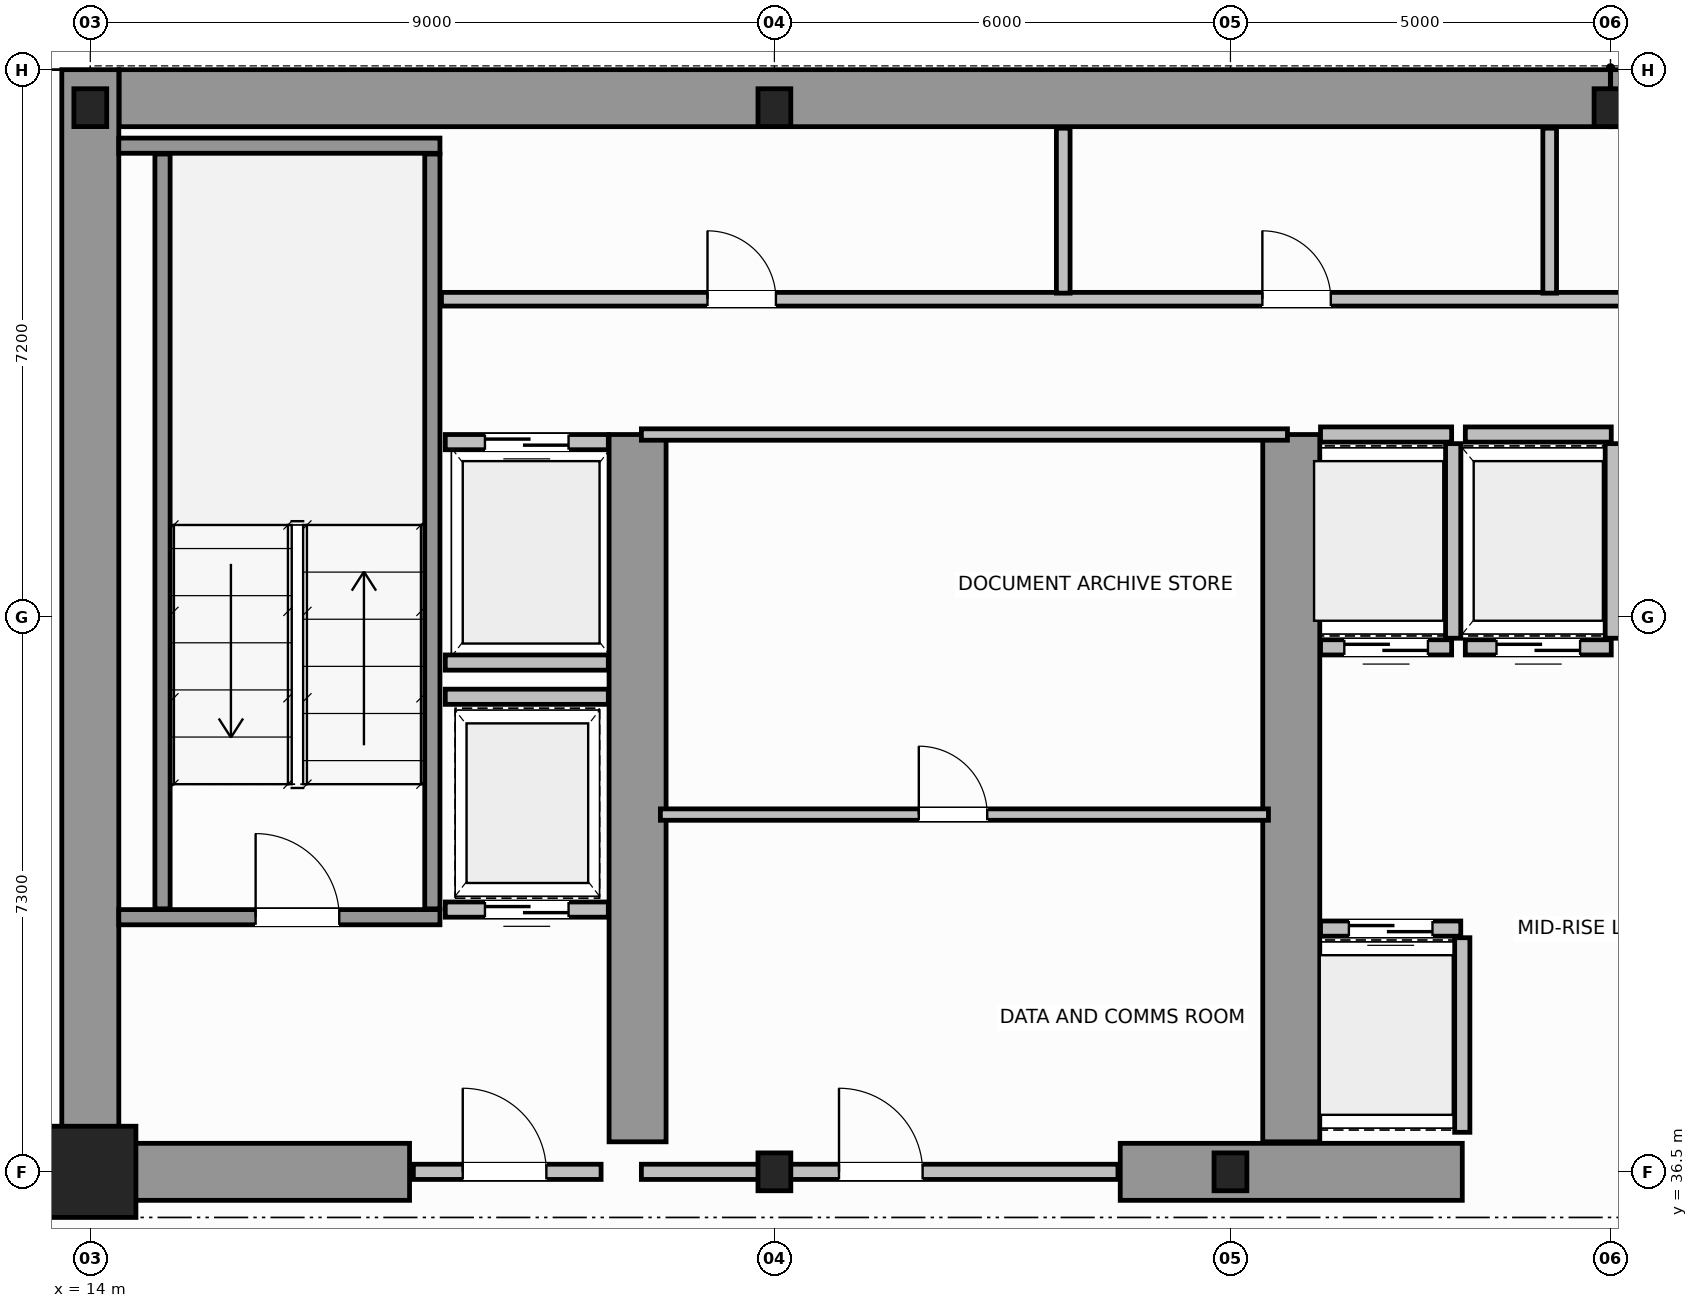
"""IFC4 building model, lengths in metres.
Left out: names, types, materials, properties, quantities, classifications, styles, units other than length and angle.
Written with IfcOpenShell. Run it as: python <this file> out.ifc"""

import sys

from ifc_helpers import new_model, si_unit, direction, frame, frame_2d, origin, origin_2d, place, context, subcontext, project, spatial, rectangle, i_section, extrude, source, transform, mapped, element, fill, save


model = new_model("IFC4")
c1 = context("Model", 3, precision=1e-05, world=origin(), true_north=direction((0.0, 1.0)))
c2 = subcontext(c1, "Body", "Model", "MODEL_VIEW")
j1 = project(units=[si_unit("LENGTHUNIT", "METRE"), si_unit("PLANEANGLEUNIT", "RADIAN")], contexts=[c1])
p1 = place(None, origin())
s1 = spatial("IfcSite", under=j1, at=p1, CompositionType="ELEMENT")
p2 = place(p1, origin())
s2 = spatial("IfcBuilding", under=s1, at=p2, CompositionType="ELEMENT")
p3 = place(p2, frame((0.0, 0.0, 165.2)))
s3 = spatial("IfcBuildingStorey", under=s2, at=p3, CompositionType="ELEMENT", Elevation=165.2)
m1 = source(origin(), c2, "Body", "SweptSolid", [
    extrude(rectangle(XDim=1.2, YDim=1.2, at=origin_2d()), origin(), (0.0, 0.0, 1.0), 3.8),
])
p4 = place(p3, frame((14.0, 36.5, 0.0), z_axis=(0.0, 0.0, 1.0), x_axis=(1.0, 0.0, 0.0)))
e1 = element("IfcColumn", 1, at=p4, inside=s3, PredefinedType="COLUMN", context=c2, shape_type="MappedRepresentation", body=[
    mapped(m1, transform((0.0, 0.0, 0.0), scale=1.0)),
])
m2 = source(origin(), c2, "Body", "SweptSolid", [
    extrude(i_section(OverallWidth=0.432, OverallDepth=0.498, WebThickness=0.055, FlangeThickness=0.068, FilletRadius=0.015, at=origin_2d()), origin(), (0.0, 0.0, 1.0), 3.8),
])
for number, where, z_axis, x_axis in (
    (2, (23.0, 36.5, 0.0), (0.0, 0.0, 1.0), (1.0, 0.0, 0.0)),
    (3, (29.0, 36.5, 0.0), (0.0, 0.0, 1.0), (1.0, 0.0, 0.0)),
    (4, (14.0, 50.5, 0.0), (0.0, 0.0, 1.0), (1.0, 0.0, 0.0)),
    (5, (23.0, 50.5, 0.0), (0.0, 0.0, 1.0), (1.0, 0.0, 0.0)),
    (6, (34.0, 50.5, 0.0), (0.0, 0.0, 1.0), (1.0, 0.0, 0.0)),
):
    element("IfcColumn", number, at=place(p3, frame(where, z_axis=z_axis, x_axis=x_axis)), inside=s3, PredefinedType="COLUMN", context=c2, shape_type="MappedRepresentation", body=[
        mapped(m2, transform((0.0, 0.0, 0.0), scale=1.0)),
    ])
for number, where, z_axis, x_axis in (
    (7, (14.379, 50.625, 0.0), (0.0, 0.0, 1.0), (1.0, 0.0, 0.0)),
    (8, (34.002, 50.625, 0.0), (0.0, 0.0, 1.0), (1.0, 0.0, 0.0)),
):
    element("IfcWall", number, at=place(p3, frame(where, z_axis=z_axis, x_axis=x_axis)), inside=s3, PredefinedType="SHEAR", context=c2, shape_type="SweptSolid", body=[
        extrude(rectangle(XDim=19.619, YDim=0.75, at=frame_2d((9.81, 0.0))), origin(), (0.0, 0.0, 1.0), 3.8),
    ])
p5 = place(p3, frame((14.0, 36.5, 0.0), z_axis=(0.0, 0.0, 1.0), x_axis=(0.0, 1.0, 0.0)))
e9 = element("IfcWall", 9, at=p5, inside=s3, PredefinedType="SHEAR", context=c2, shape_type="SweptSolid", body=[
    extrude(rectangle(XDim=14.5, YDim=0.75, at=frame_2d((7.25, 0.0))), origin(), (0.0, 0.0, 1.0), 3.8),
])
p6 = place(p3, frame((14.395, 36.5, 0.0), z_axis=(0.0, 0.0, 1.0), x_axis=(1.0, 0.0, 0.0)))
e10 = element("IfcWall", 10, at=p6, inside=s3, PredefinedType="SHEAR", context=c2, shape_type="SweptSolid", body=[
    extrude(rectangle(XDim=3.805, YDim=0.75, at=frame_2d((1.902, 0.0))), origin(), (0.0, 0.0, 1.0), 2.38),
])
p7 = place(p3, frame((27.55, 36.5, 0.0), z_axis=(0.0, 0.0, 1.0), x_axis=(1.0, 0.0, 0.0)))
e11 = element("IfcWall", 11, at=p7, inside=s3, PredefinedType="SHEAR", context=c2, shape_type="SweptSolid", body=[
    extrude(rectangle(XDim=4.5, YDim=0.75, at=frame_2d((2.25, 0.0))), origin(), (0.0, 0.0, 1.0), 3.8),
])
for number, where, z_axis, x_axis in (
    (12, (21.2, 36.895, 0.0), (0.0, 0.0, 1.0), (0.0, 1.0, 0.0)),
    (13, (29.8, 36.895, 0.0), (0.0, 0.0, 1.0), (0.0, 1.0, 0.0)),
):
    element("IfcWall", number, at=place(p3, frame(where, z_axis=z_axis, x_axis=x_axis)), inside=s3, PredefinedType="SHEAR", context=c2, shape_type="SweptSolid", body=[
        extrude(rectangle(XDim=9.305, YDim=0.75, at=frame_2d((4.652, 0.0))), origin(), (0.0, 0.0, 1.0), 3.8),
    ])
p8 = place(p3, frame((14.375, 39.85, 0.0), z_axis=(0.0, 0.0, 1.0), x_axis=(1.0, 0.0, 0.0)))
e14 = element("IfcWall", 14, at=p8, inside=s3, PredefinedType="SOLIDWALL", context=c2, shape_type="SweptSolid", body=[
    extrude(rectangle(XDim=4.225, YDim=0.2, at=frame_2d((2.113, 0.0))), origin(), (0.0, 0.0, 1.0), 3.8),
])
p9 = place(p8, frame((1.8, 0.0, 0.0)))
e15 = element("IfcOpeningElement", 15, at=p9, cuts=e14, PredefinedType="OPENING", context=c2, shape_type="SweptSolid", body=[
    extrude(rectangle(XDim=1.1, YDim=2.15, at=frame_2d((0.55, 1.075))), frame((0.0, 0.11, 0.0), z_axis=(0.0, -1.0, 0.0), x_axis=(1.0, 0.0, 0.0)), (0.0, 0.0, 1.0), 0.22),
])
p10 = place(p3, frame((14.375, 50.0, 0.0), z_axis=(0.0, 0.0, 1.0), x_axis=(1.0, 0.0, 0.0)))
e16 = element("IfcWall", 16, at=p10, inside=s3, PredefinedType="SOLIDWALL", context=c2, shape_type="SweptSolid", body=[
    extrude(rectangle(XDim=4.225, YDim=0.2, at=frame_2d((2.113, 0.0))), origin(), (0.0, 0.0, 1.0), 3.8),
])
for number, where, z_axis, x_axis in (
    (17, (14.95, 39.96, 0.0), (0.0, 0.0, 1.0), (0.0, 1.0, 0.0)),
    (18, (18.5, 39.96, 0.0), (0.0, 0.0, 1.0), (0.0, 1.0, 0.0)),
):
    element("IfcWall", number, at=place(p3, frame(where, z_axis=z_axis, x_axis=x_axis)), inside=s3, PredefinedType="SOLIDWALL", context=c2, shape_type="SweptSolid", body=[
        extrude(rectangle(XDim=9.93, YDim=0.2, at=frame_2d((4.965, 0.0))), origin(), (0.0, 0.0, 1.0), 3.8),
    ])
p11 = place(p3, frame((18.25, 36.5, 0.0), z_axis=(0.0, 0.0, 1.0), x_axis=(1.0, 0.0, 0.0)))
e19 = element("IfcWall", 19, at=p11, inside=s3, PredefinedType="SOLIDWALL", context=c2, shape_type="SweptSolid", body=[
    extrude(rectangle(XDim=2.47, YDim=0.2, at=frame_2d((1.235, 0.0))), origin(), (0.0, 0.0, 1.0), 2.37),
])
p12 = place(p11, frame((0.65, 0.0, 0.0)))
e20 = element("IfcOpeningElement", 20, at=p12, cuts=e19, PredefinedType="OPENING", context=c2, shape_type="SweptSolid", body=[
    extrude(rectangle(XDim=1.1, YDim=2.15, at=frame_2d((0.55, 1.075))), frame((0.0, 0.11, 0.0), z_axis=(0.0, -1.0, 0.0), x_axis=(1.0, 0.0, 0.0)), (0.0, 0.0, 1.0), 0.22),
])
p13 = place(p3, frame((30.185, 39.7, 0.0), z_axis=(0.0, 0.0, 1.0), x_axis=(1.0, 0.0, 0.0)))
e21 = element("IfcWall", 21, at=p13, inside=s3, PredefinedType="SOLIDWALL", context=c2, shape_type="SweptSolid", body=[
    extrude(rectangle(XDim=1.845, YDim=0.2, at=frame_2d((0.922, 0.0))), origin(), (0.0, 0.0, 1.0), 3.58),
])
p14 = place(p13, frame((0.373, 0.0, 0.0)))
e22 = element("IfcOpeningElement", 22, at=p14, cuts=e21, PredefinedType="OPENING", context=c2, shape_type="SweptSolid", body=[
    extrude(rectangle(XDim=1.1, YDim=2.15, at=frame_2d((0.55, 1.075))), frame((0.0, 0.11, 0.0), z_axis=(0.0, -1.0, 0.0), x_axis=(1.0, 0.0, 0.0)), (0.0, 0.0, 1.0), 0.22),
])
p15 = place(p3, frame((32.05, 37.02, 0.0), z_axis=(0.0, 0.0, 1.0), x_axis=(0.0, 1.0, 0.0)))
e23 = element("IfcWall", 23, at=p15, inside=s3, PredefinedType="SOLIDWALL", context=c2, shape_type="SweptSolid", body=[
    extrude(rectangle(XDim=2.56, YDim=0.2, at=frame_2d((1.28, 0.0))), origin(), (0.0, 0.0, 1.0), 3.58),
])
p16 = place(p3, frame((30.185, 43.4, 0.0), z_axis=(0.0, 0.0, 1.0), x_axis=(1.0, 0.0, 0.0)))
e24 = element("IfcWall", 24, at=p16, inside=s3, PredefinedType="SOLIDWALL", context=c2, shape_type="SweptSolid", body=[
    extrude(rectangle(XDim=1.725, YDim=0.2, at=frame_2d((0.862, 0.0))), origin(), (0.0, 0.0, 1.0), 3.58),
])
p17 = place(p16, frame((0.313, 0.0, 0.0)))
e25 = element("IfcOpeningElement", 25, at=p17, cuts=e24, PredefinedType="OPENING", context=c2, shape_type="SweptSolid", body=[
    extrude(rectangle(XDim=1.1, YDim=2.15, at=frame_2d((0.55, 1.075))), frame((0.0, 0.11, 0.0), z_axis=(0.0, -1.0, 0.0), x_axis=(1.0, 0.0, 0.0)), (0.0, 0.0, 1.0), 0.22),
])
p18 = place(p3, frame((30.185, 46.2, 0.0), z_axis=(0.0, 0.0, 1.0), x_axis=(1.0, 0.0, 0.0)))
e26 = element("IfcWall", 26, at=p18, inside=s3, PredefinedType="SOLIDWALL", context=c2, shape_type="SweptSolid", body=[
    extrude(rectangle(XDim=1.725, YDim=0.2, at=frame_2d((0.862, 0.0))), origin(), (0.0, 0.0, 1.0), 3.58),
])
p19 = place(p3, frame((31.93, 43.52, 0.0), z_axis=(0.0, 0.0, 1.0), x_axis=(0.0, 1.0, 0.0)))
e27 = element("IfcWall", 27, at=p19, inside=s3, PredefinedType="SOLIDWALL", context=c2, shape_type="SweptSolid", body=[
    extrude(rectangle(XDim=2.56, YDim=0.2, at=frame_2d((1.28, 0.0))), origin(), (0.0, 0.0, 1.0), 3.58),
])
p20 = place(p3, frame((32.09, 43.4, 0.0), z_axis=(0.0, 0.0, 1.0), x_axis=(1.0, 0.0, 0.0)))
e28 = element("IfcWall", 28, at=p20, inside=s3, PredefinedType="SOLIDWALL", context=c2, shape_type="SweptSolid", body=[
    extrude(rectangle(XDim=1.92, YDim=0.2, at=frame_2d((0.96, 0.0))), origin(), (0.0, 0.0, 1.0), 3.58),
])
p21 = place(p20, frame((0.41, 0.0, 0.0)))
e29 = element("IfcOpeningElement", 29, at=p21, cuts=e28, PredefinedType="OPENING", context=c2, shape_type="SweptSolid", body=[
    extrude(rectangle(XDim=1.1, YDim=2.15, at=frame_2d((0.55, 1.075))), frame((0.0, 0.11, 0.0), z_axis=(0.0, -1.0, 0.0), x_axis=(1.0, 0.0, 0.0)), (0.0, 0.0, 1.0), 0.22),
])
p22 = place(p3, frame((32.09, 46.2, 0.0), z_axis=(0.0, 0.0, 1.0), x_axis=(1.0, 0.0, 0.0)))
e30 = element("IfcWall", 30, at=p22, inside=s3, PredefinedType="SOLIDWALL", context=c2, shape_type="SweptSolid", body=[
    extrude(rectangle(XDim=1.92, YDim=0.2, at=frame_2d((0.96, 0.0))), origin(), (0.0, 0.0, 1.0), 3.58),
])
p23 = place(p3, frame((34.03, 43.52, 0.0), z_axis=(0.0, 0.0, 1.0), x_axis=(0.0, 1.0, 0.0)))
e31 = element("IfcWall", 31, at=p23, inside=s3, PredefinedType="SOLIDWALL", context=c2, shape_type="SweptSolid", body=[
    extrude(rectangle(XDim=2.56, YDim=0.2, at=frame_2d((1.28, 0.0))), origin(), (0.0, 0.0, 1.0), 3.58),
])
p24 = place(p3, frame((18.67, 46.1, 0.0), z_axis=(0.0, 0.0, 1.0), x_axis=(1.0, 0.0, 0.0)))
e32 = element("IfcWall", 32, at=p24, inside=s3, PredefinedType="SOLIDWALL", context=c2, shape_type="SweptSolid", body=[
    extrude(rectangle(XDim=2.145, YDim=0.2, at=frame_2d((1.073, 0.0))), origin(), (0.0, 0.0, 1.0), 3.58),
])
p25 = place(p24, frame((0.522, 0.0, 0.0)))
e33 = element("IfcOpeningElement", 33, at=p25, cuts=e32, PredefinedType="OPENING", context=c2, shape_type="SweptSolid", body=[
    extrude(rectangle(XDim=1.1, YDim=2.15, at=frame_2d((0.55, 1.075))), frame((0.0, 0.11, 0.0), z_axis=(0.0, -1.0, 0.0), x_axis=(1.0, 0.0, 0.0)), (0.0, 0.0, 1.0), 0.22),
])
p26 = place(p3, frame((18.67, 43.2, 0.0), z_axis=(0.0, 0.0, 1.0), x_axis=(1.0, 0.0, 0.0)))
e34 = element("IfcWall", 34, at=p26, inside=s3, PredefinedType="SOLIDWALL", context=c2, shape_type="SweptSolid", body=[
    extrude(rectangle(XDim=2.145, YDim=0.2, at=frame_2d((1.073, 0.0))), origin(), (0.0, 0.0, 1.0), 3.58),
])
p27 = place(p3, frame((18.67, 39.95, 0.0), z_axis=(0.0, 0.0, 1.0), x_axis=(1.0, 0.0, 0.0)))
e35 = element("IfcWall", 35, at=p27, inside=s3, PredefinedType="SOLIDWALL", context=c2, shape_type="SweptSolid", body=[
    extrude(rectangle(XDim=2.145, YDim=0.2, at=frame_2d((1.073, 0.0))), origin(), (0.0, 0.0, 1.0), 3.58),
])
p28 = place(p27, frame((0.522, 0.0, 0.0)))
e36 = element("IfcOpeningElement", 36, at=p28, cuts=e35, PredefinedType="OPENING", context=c2, shape_type="SweptSolid", body=[
    extrude(rectangle(XDim=1.1, YDim=2.15, at=frame_2d((0.55, 1.075))), frame((0.0, 0.11, 0.0), z_axis=(0.0, -1.0, 0.0), x_axis=(1.0, 0.0, 0.0)), (0.0, 0.0, 1.0), 0.22),
])
p29 = place(p3, frame((18.67, 42.75, 0.0), z_axis=(0.0, 0.0, 1.0), x_axis=(1.0, 0.0, 0.0)))
e37 = element("IfcWall", 37, at=p29, inside=s3, PredefinedType="SOLIDWALL", context=c2, shape_type="SweptSolid", body=[
    extrude(rectangle(XDim=2.145, YDim=0.2, at=frame_2d((1.073, 0.0))), origin(), (0.0, 0.0, 1.0), 3.58),
])
p30 = place(p3, frame((21.25, 36.5, 0.0), z_axis=(0.0, 0.0, 1.0), x_axis=(1.0, 0.0, 0.0)))
e38 = element("IfcWall", 38, at=p30, inside=s3, PredefinedType="SOLIDWALL", context=c2, shape_type="SweptSolid", body=[
    extrude(rectangle(XDim=6.27, YDim=0.2, at=frame_2d((3.135, 0.0))), origin(), (0.0, 0.0, 1.0), 2.37),
])
p31 = place(p30, frame((2.6, 0.0, 0.0)))
e39 = element("IfcOpeningElement", 39, at=p31, cuts=e38, PredefinedType="OPENING", context=c2, shape_type="SweptSolid", body=[
    extrude(rectangle(XDim=1.1, YDim=2.15, at=frame_2d((0.55, 1.075))), frame((0.0, 0.11, 0.0), z_axis=(0.0, -1.0, 0.0), x_axis=(1.0, 0.0, 0.0)), (0.0, 0.0, 1.0), 0.22),
])
p32 = place(p3, frame((21.25, 46.2, 0.0), z_axis=(0.0, 0.0, 1.0), x_axis=(1.0, 0.0, 0.0)))
e40 = element("IfcWall", 40, at=p32, inside=s3, PredefinedType="PARTITIONING", context=c2, shape_type="SweptSolid", body=[
    extrude(rectangle(XDim=8.5, YDim=0.15, at=frame_2d((4.25, 0.0))), origin(), (0.0, 0.0, 1.0), 3.58),
])
p33 = place(p3, frame((21.5, 41.2, 0.0), z_axis=(0.0, 0.0, 1.0), x_axis=(1.0, 0.0, 0.0)))
e41 = element("IfcWall", 41, at=p33, inside=s3, PredefinedType="PARTITIONING", context=c2, shape_type="SweptSolid", body=[
    extrude(rectangle(XDim=8.0, YDim=0.15, at=frame_2d((4.0, 0.0))), origin(), (0.0, 0.0, 1.0), 3.58),
])
p34 = place(p33, frame((3.4, 0.0, 0.0)))
e42 = element("IfcOpeningElement", 42, at=p34, cuts=e41, PredefinedType="OPENING", context=c2, shape_type="SweptSolid", body=[
    extrude(rectangle(XDim=0.9, YDim=2.1, at=frame_2d((0.45, 1.05))), frame((0.0, 0.085, 0.0), z_axis=(0.0, -1.0, 0.0), x_axis=(1.0, 0.0, 0.0)), (0.0, 0.0, 1.0), 0.17),
])
p35 = place(p3, frame((18.62, 47.98, 0.0), z_axis=(0.0, 0.0, 1.0), x_axis=(1.0, 0.0, 0.0)))
e43 = element("IfcWall", 43, at=p35, inside=s3, PredefinedType="PLUMBINGWALL", context=c2, shape_type="SweptSolid", body=[
    extrude(rectangle(XDim=20.06, YDim=0.18, at=frame_2d((10.03, 0.0))), origin(), (0.0, 0.0, 1.0), 3.58),
])
p36 = place(p35, frame((3.5, 0.0, 0.0)))
e44 = element("IfcOpeningElement", 44, at=p36, cuts=e43, PredefinedType="OPENING", context=c2, shape_type="SweptSolid", body=[
    extrude(rectangle(XDim=0.9, YDim=2.15, at=frame_2d((0.45, 1.075))), frame((0.0, 0.1, 0.0), z_axis=(0.0, -1.0, 0.0), x_axis=(1.0, 0.0, 0.0)), (0.0, 0.0, 1.0), 0.2),
])
p37 = place(p35, frame((10.8, 0.0, 0.0)))
e45 = element("IfcOpeningElement", 45, at=p37, cuts=e43, PredefinedType="OPENING", context=c2, shape_type="SweptSolid", body=[
    extrude(rectangle(XDim=0.9, YDim=2.15, at=frame_2d((0.45, 1.075))), frame((0.0, 0.1, 0.0), z_axis=(0.0, -1.0, 0.0), x_axis=(1.0, 0.0, 0.0)), (0.0, 0.0, 1.0), 0.2),
])
p38 = place(p35, frame((16.8, 0.0, 0.0)))
e46 = element("IfcOpeningElement", 46, at=p38, cuts=e43, PredefinedType="OPENING", context=c2, shape_type="SweptSolid", body=[
    extrude(rectangle(XDim=0.9, YDim=2.15, at=frame_2d((0.45, 1.075))), frame((0.0, 0.1, 0.0), z_axis=(0.0, -1.0, 0.0), x_axis=(1.0, 0.0, 0.0)), (0.0, 0.0, 1.0), 0.2),
])
for number, where, z_axis, x_axis in (
    (47, (26.8, 48.06, 0.0), (0.0, 0.0, 1.0), (0.0, 1.0, 0.0)),
    (48, (33.2, 48.06, 0.0), (0.0, 0.0, 1.0), (0.0, 1.0, 0.0)),
):
    element("IfcWall", number, at=place(p3, frame(where, z_axis=z_axis, x_axis=x_axis)), inside=s3, PredefinedType="PLUMBINGWALL", context=c2, shape_type="SweptSolid", body=[
        extrude(rectangle(XDim=2.17, YDim=0.18, at=frame_2d((1.085, 0.0))), origin(), (0.0, 0.0, 1.0), 3.58),
    ])
p39 = place(p3, frame((7.274, 36.48, 0.0), z_axis=(0.0, 0.0, 1.0), x_axis=(1.0, 0.0, 0.0)))
e49 = element("IfcWall", 49, at=p39, inside=s3, PredefinedType="PARTITIONING", context=c2, shape_type="SweptSolid", body=[
    extrude(rectangle(XDim=6.666, YDim=0.12, at=frame_2d((3.333, 0.0))), origin(), (0.0, 0.0, 1.0), 2.97),
])
p40 = place(p39, frame((2.883, 0.0, 0.0)))
e50 = element("IfcOpeningElement", 50, at=p40, cuts=e49, PredefinedType="OPENING", context=c2, shape_type="SweptSolid", body=[
    extrude(rectangle(XDim=0.9, YDim=2.15, at=frame_2d((0.45, 1.075))), frame((0.0, 0.07, 0.0), z_axis=(0.0, -1.0, 0.0), x_axis=(1.0, 0.0, 0.0)), (0.0, 0.0, 1.0), 0.14),
])
m3 = source(origin(), c2, "Body", "SweptSolid", [
    extrude(rectangle(XDim=1.1, YDim=2.15, at=frame_2d((0.55, 1.075))), frame((0.0, 0.025, 0.0), z_axis=(0.0, -1.0, 0.0), x_axis=(1.0, 0.0, 0.0)), (0.0, 0.0, 1.0), 0.05),
])
p41 = place(p9, origin())
e51 = element("IfcDoor", 51, at=p41, inside=s3, OperationType="SINGLE_SWING_LEFT", PredefinedType="DOOR", context=c2, shape_type="MappedRepresentation", body=[
    mapped(m3, transform((0.0, 0.0, 0.0), scale=1.0)),
])
fill(e15, e51)
p42 = place(p12, origin())
e52 = element("IfcDoor", 52, at=p42, inside=s3, OperationType="SINGLE_SWING_RIGHT", PredefinedType="DOOR", context=c2, shape_type="MappedRepresentation", body=[
    mapped(m3, transform((0.0, 0.0, 0.0), scale=1.0)),
])
fill(e20, e52)
p43 = place(p14, origin())
e53 = element("IfcDoor", 53, at=p43, inside=s3, OperationType="DOUBLE_DOOR_SLIDING", PredefinedType="DOOR", context=c2, shape_type="MappedRepresentation", body=[
    mapped(m3, transform((0.0, 0.0, 0.0), scale=1.0)),
])
fill(e22, e53)
p44 = place(p17, origin())
e54 = element("IfcDoor", 54, at=p44, inside=s3, OperationType="DOUBLE_DOOR_SLIDING", PredefinedType="DOOR", context=c2, shape_type="MappedRepresentation", body=[
    mapped(m3, transform((0.0, 0.0, 0.0), scale=1.0)),
])
fill(e25, e54)
p45 = place(p21, origin())
e55 = element("IfcDoor", 55, at=p45, inside=s3, OperationType="DOUBLE_DOOR_SLIDING", PredefinedType="DOOR", context=c2, shape_type="MappedRepresentation", body=[
    mapped(m3, transform((0.0, 0.0, 0.0), scale=1.0)),
])
fill(e29, e55)
p46 = place(p25, origin())
e56 = element("IfcDoor", 56, at=p46, inside=s3, OperationType="DOUBLE_DOOR_SLIDING", PredefinedType="DOOR", context=c2, shape_type="MappedRepresentation", body=[
    mapped(m3, transform((0.0, 0.0, 0.0), scale=1.0)),
])
fill(e33, e56)
p47 = place(p28, origin())
e57 = element("IfcDoor", 57, at=p47, inside=s3, OperationType="DOUBLE_DOOR_SLIDING", PredefinedType="DOOR", context=c2, shape_type="MappedRepresentation", body=[
    mapped(m3, transform((0.0, 0.0, 0.0), scale=1.0)),
])
fill(e36, e57)
p48 = place(p31, origin())
e58 = element("IfcDoor", 58, at=p48, inside=s3, OperationType="SINGLE_SWING_LEFT", PredefinedType="DOOR", context=c2, shape_type="MappedRepresentation", body=[
    mapped(m3, transform((0.0, 0.0, 0.0), scale=1.0)),
])
fill(e39, e58)
m4 = source(origin(), c2, "Body", "SweptSolid", [
    extrude(rectangle(XDim=0.9, YDim=2.1, at=frame_2d((0.45, 1.05))), frame((0.0, 0.025, 0.0), z_axis=(0.0, -1.0, 0.0), x_axis=(1.0, 0.0, 0.0)), (0.0, 0.0, 1.0), 0.05),
])
p49 = place(p34, origin())
e59 = element("IfcDoor", 59, at=p49, inside=s3, OperationType="SINGLE_SWING_RIGHT", PredefinedType="DOOR", context=c2, shape_type="MappedRepresentation", body=[
    mapped(m4, transform((0.0, 0.0, 0.0), scale=1.0)),
])
fill(e42, e59)
m5 = source(origin(), c2, "Body", "SweptSolid", [
    extrude(rectangle(XDim=0.9, YDim=2.15, at=frame_2d((0.45, 1.075))), frame((0.0, 0.025, 0.0), z_axis=(0.0, -1.0, 0.0), x_axis=(1.0, 0.0, 0.0)), (0.0, 0.0, 1.0), 0.05),
])
p50 = place(p36, origin())
e60 = element("IfcDoor", 60, at=p50, inside=s3, OperationType="SINGLE_SWING_LEFT", PredefinedType="DOOR", context=c2, shape_type="MappedRepresentation", body=[
    mapped(m5, transform((0.0, 0.0, 0.0), scale=1.0)),
])
fill(e44, e60)
p51 = place(p37, origin())
e61 = element("IfcDoor", 61, at=p51, inside=s3, OperationType="SINGLE_SWING_RIGHT", PredefinedType="DOOR", context=c2, shape_type="MappedRepresentation", body=[
    mapped(m5, transform((0.0, 0.0, 0.0), scale=1.0)),
])
fill(e45, e61)
save(model, sys.argv[1])
